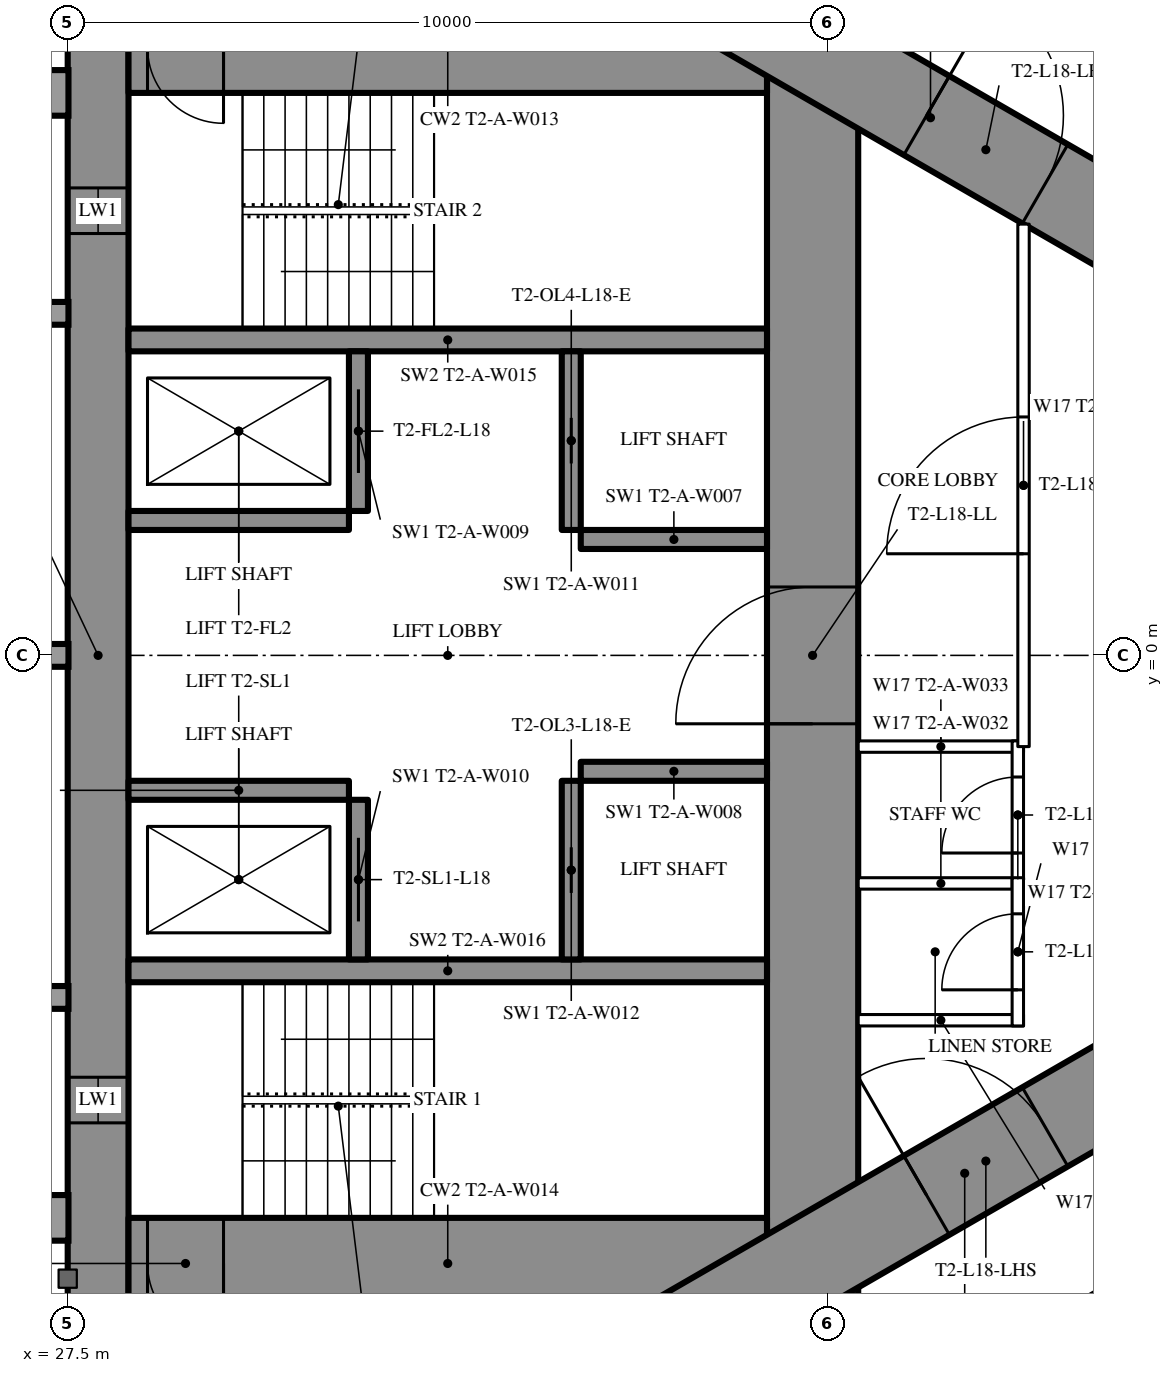
"""IFC4 building model, lengths in metres.
Left out: names, types, materials, properties, quantities, classifications, styles, units other than length and angle.
Written with IfcOpenShell. Run it as: python <this file> out.ifc"""

import sys

from ifc_helpers import new_model, si_unit, direction, frame, frame_2d, origin, place, context, subcontext, project, spatial, rectangle, extrude, element, fill, save


model = new_model("IFC4")
c1 = context("Model", 3, precision=1e-05, world=origin(), true_north=direction((0.0, 1.0)))
c2 = subcontext(c1, "Body", "Model", "MODEL_VIEW")
j1 = project(units=[si_unit("LENGTHUNIT", "METRE"), si_unit("PLANEANGLEUNIT", "RADIAN")], contexts=[c1])
p1 = place(None, origin())
s1 = spatial("IfcSite", under=j1, at=p1, CompositionType="ELEMENT")
p2 = place(p1, origin())
s2 = spatial("IfcBuilding", under=s1, at=p2, CompositionType="ELEMENT")
p3 = place(p2, frame((0.0, 0.0, 70.5)))
s3 = spatial("IfcBuildingStorey", under=s2, at=p3, CompositionType="ELEMENT", Elevation=70.5)
p4 = place(p3, frame((27.9, -8.6, 0.0), z_axis=(0.0, 0.0, 1.0), x_axis=(0.0, 1.0, 0.0)))
e1 = element("IfcWall", 1, at=p4, inside=s3, PredefinedType="SHEAR", context=c2, shape_type="SweptSolid", body=[
    extrude(rectangle(XDim=17.2, YDim=0.8, at=frame_2d((8.6, 0.0))), origin(), (0.0, 0.0, 1.0), 3.5),
])
p5 = place(p4, frame((2.45, 0.0, 0.6)))
e2 = element("IfcOpeningElement", 2, at=p5, cuts=e1, PredefinedType="OPENING", context=c2, shape_type="SweptSolid", body=[
    extrude(rectangle(XDim=0.6, YDim=2.1, at=frame_2d((0.3, 1.05))), frame((0.0, 0.41, 0.0), z_axis=(0.0, -1.0, 0.0), x_axis=(1.0, 0.0, 0.0)), (0.0, 0.0, 1.0), 0.82),
])
p6 = place(p4, frame((14.15, 0.0, 0.6)))
e3 = element("IfcOpeningElement", 3, at=p6, cuts=e1, PredefinedType="OPENING", context=c2, shape_type="SweptSolid", body=[
    extrude(rectangle(XDim=0.6, YDim=2.1, at=frame_2d((0.3, 1.05))), frame((0.0, 0.41, 0.0), z_axis=(0.0, -1.0, 0.0), x_axis=(1.0, 0.0, 0.0)), (0.0, 0.0, 1.0), 0.82),
])
p7 = place(p3, frame((37.3, -8.6, 0.0), z_axis=(0.0, 0.0, 1.0), x_axis=(0.0, 1.0, 0.0)))
e4 = element("IfcWall", 4, at=p7, inside=s3, PredefinedType="SHEAR", context=c2, shape_type="SweptSolid", body=[
    extrude(rectangle(XDim=17.2, YDim=1.2, at=frame_2d((8.6, 0.0))), origin(), (0.0, 0.0, 1.0), 3.5),
])
p8 = place(p7, frame((7.7, 0.0, 0.0)))
e5 = element("IfcOpeningElement", 5, at=p8, cuts=e4, PredefinedType="OPENING", context=c2, shape_type="SweptSolid", body=[
    extrude(rectangle(XDim=1.8, YDim=2.2, at=frame_2d((0.9, 1.1))), frame((0.0, 0.61, 0.0), z_axis=(0.0, -1.0, 0.0), x_axis=(1.0, 0.0, 0.0)), (0.0, 0.0, 1.0), 1.22),
])
p9 = place(p3, frame((28.3, -8.0, 0.0), z_axis=(0.0, 0.0, 1.0), x_axis=(1.0, 0.0, 0.0)))
e6 = element("IfcWall", 6, at=p9, inside=s3, PredefinedType="SHEAR", context=c2, shape_type="SweptSolid", body=[
    extrude(rectangle(XDim=8.4, YDim=1.2, at=frame_2d((4.2, 0.0))), origin(), (0.0, 0.0, 1.0), 3.5),
])
p10 = place(p9, frame((0.25, 0.0, 0.0)))
e7 = element("IfcOpeningElement", 7, at=p10, cuts=e6, PredefinedType="OPENING", context=c2, shape_type="SweptSolid", body=[
    extrude(rectangle(XDim=1.0, YDim=2.2, at=frame_2d((0.5, 1.1))), frame((0.0, 0.61, 0.0), z_axis=(0.0, -1.0, 0.0), x_axis=(1.0, 0.0, 0.0)), (0.0, 0.0, 1.0), 1.22),
])
p11 = place(p3, frame((28.3, 8.0, 0.0), z_axis=(0.0, 0.0, 1.0), x_axis=(1.0, 0.0, 0.0)))
e8 = element("IfcWall", 8, at=p11, inside=s3, PredefinedType="SHEAR", context=c2, shape_type="SweptSolid", body=[
    extrude(rectangle(XDim=8.4, YDim=1.2, at=frame_2d((4.2, 0.0))), origin(), (0.0, 0.0, 1.0), 3.5),
])
p12 = place(p11, frame((0.25, 0.0, 0.0)))
e9 = element("IfcOpeningElement", 9, at=p12, cuts=e8, PredefinedType="OPENING", context=c2, shape_type="SweptSolid", body=[
    extrude(rectangle(XDim=1.0, YDim=2.2, at=frame_2d((0.5, 1.1))), frame((0.0, 0.61, 0.0), z_axis=(0.0, -1.0, 0.0), x_axis=(1.0, 0.0, 0.0)), (0.0, 0.0, 1.0), 1.22),
])
for number, where, z_axis, x_axis in (
    (10, (28.3, -4.15, 0.0), (0.0, 0.0, 1.0), (1.0, 0.0, 0.0)),
    (11, (28.3, 4.15, 0.0), (0.0, 0.0, 1.0), (1.0, 0.0, 0.0)),
):
    element("IfcWall", number, at=place(p3, frame(where, z_axis=z_axis, x_axis=x_axis)), inside=s3, PredefinedType="SHEAR", context=c2, shape_type="SweptSolid", body=[
        extrude(rectangle(XDim=8.4, YDim=0.3, at=frame_2d((4.2, 0.0))), origin(), (0.0, 0.0, 1.0), 3.5),
    ])
p13 = place(p3, frame((31.325, -4.0, 0.0), z_axis=(0.0, 0.0, 1.0), x_axis=(0.0, 1.0, 0.0)))
e12 = element("IfcWall", 12, at=p13, inside=s3, PredefinedType="SHEAR", context=c2, shape_type="SweptSolid", body=[
    extrude(rectangle(XDim=2.1, YDim=0.25, at=frame_2d((1.05, 0.0))), origin(), (0.0, 0.0, 1.0), 3.5),
])
p14 = place(p13, frame((0.5, 0.0, 0.0)))
e13 = element("IfcOpeningElement", 13, at=p14, cuts=e12, PredefinedType="OPENING", context=c2, shape_type="SweptSolid", body=[
    extrude(rectangle(XDim=1.1, YDim=2.2, at=frame_2d((0.55, 1.1))), frame((0.0, 0.135, 0.0), z_axis=(0.0, -1.0, 0.0), x_axis=(1.0, 0.0, 0.0)), (0.0, 0.0, 1.0), 0.27),
])
p15 = place(p3, frame((34.125, -4.0, 0.0), z_axis=(0.0, 0.0, 1.0), x_axis=(0.0, 1.0, 0.0)))
e14 = element("IfcWall", 14, at=p15, inside=s3, PredefinedType="SHEAR", context=c2, shape_type="SweptSolid", body=[
    extrude(rectangle(XDim=2.35, YDim=0.25, at=frame_2d((1.175, 0.0))), origin(), (0.0, 0.0, 1.0), 3.5),
])
p16 = place(p15, frame((0.875, 0.0, 0.0)))
e15 = element("IfcOpeningElement", 15, at=p16, cuts=e14, PredefinedType="OPENING", context=c2, shape_type="SweptSolid", body=[
    extrude(rectangle(XDim=0.6, YDim=2.0, at=frame_2d((0.3, 1.0))), frame((0.0, 0.135, 0.0), z_axis=(0.0, -1.0, 0.0), x_axis=(1.0, 0.0, 0.0)), (0.0, 0.0, 1.0), 0.27),
])
p17 = place(p3, frame((28.3, -1.775, 0.0), z_axis=(0.0, 0.0, 1.0), x_axis=(1.0, 0.0, 0.0)))
e16 = element("IfcWall", 16, at=p17, inside=s3, PredefinedType="SHEAR", context=c2, shape_type="SweptSolid", body=[
    extrude(rectangle(XDim=2.9, YDim=0.25, at=frame_2d((1.45, 0.0))), origin(), (0.0, 0.0, 1.0), 3.5),
])
p18 = place(p3, frame((34.25, -1.525, 0.0), z_axis=(0.0, 0.0, 1.0), x_axis=(1.0, 0.0, 0.0)))
e17 = element("IfcWall", 17, at=p18, inside=s3, PredefinedType="SHEAR", context=c2, shape_type="SweptSolid", body=[
    extrude(rectangle(XDim=2.45, YDim=0.25, at=frame_2d((1.225, 0.0))), origin(), (0.0, 0.0, 1.0), 3.5),
])
p19 = place(p3, frame((31.325, 1.9, 0.0), z_axis=(0.0, 0.0, 1.0), x_axis=(0.0, 1.0, 0.0)))
e18 = element("IfcWall", 18, at=p19, inside=s3, PredefinedType="SHEAR", context=c2, shape_type="SweptSolid", body=[
    extrude(rectangle(XDim=2.1, YDim=0.25, at=frame_2d((1.05, 0.0))), origin(), (0.0, 0.0, 1.0), 3.5),
])
p20 = place(p19, frame((0.5, 0.0, 0.0)))
e19 = element("IfcOpeningElement", 19, at=p20, cuts=e18, PredefinedType="OPENING", context=c2, shape_type="SweptSolid", body=[
    extrude(rectangle(XDim=1.1, YDim=2.2, at=frame_2d((0.55, 1.1))), frame((0.0, 0.135, 0.0), z_axis=(0.0, -1.0, 0.0), x_axis=(1.0, 0.0, 0.0)), (0.0, 0.0, 1.0), 0.27),
])
p21 = place(p3, frame((34.125, 1.65, 0.0), z_axis=(0.0, 0.0, 1.0), x_axis=(0.0, 1.0, 0.0)))
e20 = element("IfcWall", 20, at=p21, inside=s3, PredefinedType="SHEAR", context=c2, shape_type="SweptSolid", body=[
    extrude(rectangle(XDim=2.35, YDim=0.25, at=frame_2d((1.175, 0.0))), origin(), (0.0, 0.0, 1.0), 3.5),
])
p22 = place(p21, frame((0.875, 0.0, 0.0)))
e21 = element("IfcOpeningElement", 21, at=p22, cuts=e20, PredefinedType="OPENING", context=c2, shape_type="SweptSolid", body=[
    extrude(rectangle(XDim=0.6, YDim=2.0, at=frame_2d((0.3, 1.0))), frame((0.0, 0.135, 0.0), z_axis=(0.0, -1.0, 0.0), x_axis=(1.0, 0.0, 0.0)), (0.0, 0.0, 1.0), 0.27),
])
p23 = place(p3, frame((28.3, 1.775, 0.0), z_axis=(0.0, 0.0, 1.0), x_axis=(1.0, 0.0, 0.0)))
e22 = element("IfcWall", 22, at=p23, inside=s3, PredefinedType="SHEAR", context=c2, shape_type="SweptSolid", body=[
    extrude(rectangle(XDim=2.9, YDim=0.25, at=frame_2d((1.45, 0.0))), origin(), (0.0, 0.0, 1.0), 3.5),
])
p24 = place(p3, frame((34.25, 1.525, 0.0), z_axis=(0.0, 0.0, 1.0), x_axis=(1.0, 0.0, 0.0)))
e23 = element("IfcWall", 23, at=p24, inside=s3, PredefinedType="SHEAR", context=c2, shape_type="SweptSolid", body=[
    extrude(rectangle(XDim=2.45, YDim=0.25, at=frame_2d((1.225, 0.0))), origin(), (0.0, 0.0, 1.0), 3.5),
])
p25 = place(p3, frame((27.2, -13.8, 0.0), z_axis=(0.0, 0.0, 1.0), x_axis=(0.866027159892, 0.499996958321, 0.0)))
e24 = element("IfcWall", 24, at=p25, inside=s3, PredefinedType="SHEAR", context=c2, shape_type="SweptSolid", body=[
    extrude(rectangle(XDim=27.947, YDim=1.2, at=frame_2d((13.973, 0.0))), origin(), (0.0, 0.0, 1.0), 3.5),
])
p26 = place(p25, frame((4.6, 0.0, 0.0)))
e25 = element("IfcOpeningElement", 25, at=p26, cuts=e24, PredefinedType="OPENING", context=c2, shape_type="SweptSolid", body=[
    extrude(rectangle(XDim=1.0, YDim=2.2, at=frame_2d((0.5, 1.1))), frame((0.0, 0.61, 0.0), z_axis=(0.0, -1.0, 0.0), x_axis=(1.0, 0.0, 0.0)), (0.0, 0.0, 1.0), 1.22),
])
p27 = place(p25, frame((13.395, 0.0, 0.0)))
e26 = element("IfcOpeningElement", 26, at=p27, cuts=e24, PredefinedType="OPENING", context=c2, shape_type="SweptSolid", body=[
    extrude(rectangle(XDim=1.8, YDim=2.2, at=frame_2d((0.9, 1.1))), frame((0.0, 0.61, 0.0), z_axis=(0.0, -1.0, 0.0), x_axis=(1.0, 0.0, 0.0)), (0.0, 0.0, 1.0), 1.22),
])
p28 = place(p3, frame((27.2, 13.8, 0.0), z_axis=(0.0, 0.0, 1.0), x_axis=(0.866024515034, -0.500001539357, 0.0)))
e27 = element("IfcWall", 27, at=p28, inside=s3, PredefinedType="SHEAR", context=c2, shape_type="SweptSolid", body=[
    extrude(rectangle(XDim=26.907, YDim=1.2, at=frame_2d((13.454, 0.0))), origin(), (0.0, 0.0, 1.0), 3.5),
])
p29 = place(p28, frame((4.6, 0.0, 0.0)))
e28 = element("IfcOpeningElement", 28, at=p29, cuts=e27, PredefinedType="OPENING", context=c2, shape_type="SweptSolid", body=[
    extrude(rectangle(XDim=1.0, YDim=2.2, at=frame_2d((0.5, 1.1))), frame((0.0, 0.61, 0.0), z_axis=(0.0, -1.0, 0.0), x_axis=(1.0, 0.0, 0.0)), (0.0, 0.0, 1.0), 1.22),
])
p30 = place(p28, frame((13.395, 0.0, 0.0)))
e29 = element("IfcOpeningElement", 29, at=p30, cuts=e27, PredefinedType="OPENING", context=c2, shape_type="SweptSolid", body=[
    extrude(rectangle(XDim=1.8, YDim=2.2, at=frame_2d((0.9, 1.1))), frame((0.0, 0.61, 0.0), z_axis=(0.0, -1.0, 0.0), x_axis=(1.0, 0.0, 0.0)), (0.0, 0.0, 1.0), 1.22),
])
p31 = place(p3, frame((36.834, 10.894, 0.0), z_axis=(0.0, 0.0, 1.0), x_axis=(0.866028157229, -0.499995230863, 0.0)))
e30 = element("IfcWall", 30, at=p31, inside=s3, PredefinedType="PARTITIONING", context=c2, shape_type="SweptSolid", body=[
    extrude(rectangle(XDim=21.667, YDim=0.2, at=frame_2d((10.833, 0.0))), origin(), (0.0, 0.0, 1.0), 3.25),
])
p32 = place(p31, frame((18.885, 0.0, 0.0)))
e31 = element("IfcOpeningElement", 31, at=p32, cuts=e30, PredefinedType="OPENING", context=c2, shape_type="SweptSolid", body=[
    extrude(rectangle(XDim=0.95, YDim=2.2, at=frame_2d((0.475, 1.1))), frame((0.0, 0.11, 0.0), z_axis=(0.0, -1.0, 0.0), x_axis=(1.0, 0.0, 0.0)), (0.0, 0.0, 1.0), 0.22),
])
p33 = place(p31, frame((15.443, 0.0, 0.0)))
e32 = element("IfcOpeningElement", 32, at=p33, cuts=e30, PredefinedType="OPENING", context=c2, shape_type="SweptSolid", body=[
    extrude(rectangle(XDim=1.8, YDim=2.2, at=frame_2d((0.9, 1.1))), frame((0.0, 0.11, 0.0), z_axis=(0.0, -1.0, 0.0), x_axis=(1.0, 0.0, 0.0)), (0.0, 0.0, 1.0), 0.22),
])
p34 = place(p31, frame((12.562, 0.0, 0.0)))
e33 = element("IfcOpeningElement", 33, at=p34, cuts=e30, PredefinedType="OPENING", context=c2, shape_type="SweptSolid", body=[
    extrude(rectangle(XDim=0.95, YDim=2.2, at=frame_2d((0.475, 1.1))), frame((0.0, 0.11, 0.0), z_axis=(0.0, -1.0, 0.0), x_axis=(1.0, 0.0, 0.0)), (0.0, 0.0, 1.0), 0.22),
])
p35 = place(p31, frame((4.292, 0.0, 0.0)))
e34 = element("IfcOpeningElement", 34, at=p35, cuts=e30, PredefinedType="OPENING", context=c2, shape_type="SweptSolid", body=[
    extrude(rectangle(XDim=1.0, YDim=2.2, at=frame_2d((0.5, 1.1))), frame((0.0, 0.11, 0.0), z_axis=(0.0, -1.0, 0.0), x_axis=(1.0, 0.0, 0.0)), (0.0, 0.0, 1.0), 0.22),
])
p36 = place(p3, frame((37.96, -10.243, 0.0), z_axis=(0.0, 0.0, 1.0), x_axis=(0.866030548046, 0.499991089772, 0.0)))
e35 = element("IfcWall", 35, at=p36, inside=s3, PredefinedType="PARTITIONING", context=c2, shape_type="SweptSolid", body=[
    extrude(rectangle(XDim=12.849, YDim=0.2, at=frame_2d((6.425, 0.0))), origin(), (0.0, 0.0, 1.0), 3.25),
])
p37 = place(p36, frame((8.949, 0.0, 0.0)))
e36 = element("IfcOpeningElement", 36, at=p37, cuts=e35, PredefinedType="OPENING", context=c2, shape_type="SweptSolid", body=[
    extrude(rectangle(XDim=0.95, YDim=2.2, at=frame_2d((0.475, 1.1))), frame((0.0, 0.11, 0.0), z_axis=(0.0, -1.0, 0.0), x_axis=(1.0, 0.0, 0.0)), (0.0, 0.0, 1.0), 0.22),
])
p38 = place(p36, frame((0.6, 0.0, 0.0)))
e37 = element("IfcOpeningElement", 37, at=p38, cuts=e35, PredefinedType="OPENING", context=c2, shape_type="SweptSolid", body=[
    extrude(rectangle(XDim=0.95, YDim=2.2, at=frame_2d((0.475, 1.1))), frame((0.0, 0.11, 0.0), z_axis=(0.0, -1.0, 0.0), x_axis=(1.0, 0.0, 0.0)), (0.0, 0.0, 1.0), 0.22),
])
for number, where, z_axis, x_axis in (
    (38, (37.9, -1.2, 0.0), (0.0, 0.0, 1.0), (1.0, 0.0, 0.0)),
    (39, (37.9, -3.0, 0.0), (0.0, 0.0, 1.0), (1.0, 0.0, 0.0)),
    (40, (37.9, -4.8, 0.0), (0.0, 0.0, 1.0), (1.0, 0.0, 0.0)),
):
    element("IfcWall", number, at=place(p3, frame(where, z_axis=z_axis, x_axis=x_axis)), inside=s3, PredefinedType="PARTITIONING", context=c2, shape_type="SweptSolid", body=[
        extrude(rectangle(XDim=2.175, YDim=0.15, at=frame_2d((1.087, 0.0))), origin(), (0.0, 0.0, 1.0), 3.25),
    ])
p39 = place(p3, frame((40.0, -3.075, 0.0), z_axis=(0.0, 0.0, 1.0), x_axis=(0.0, 1.0, 0.0)))
e41 = element("IfcWall", 41, at=p39, inside=s3, PredefinedType="PARTITIONING", context=c2, shape_type="SweptSolid", body=[
    extrude(rectangle(XDim=1.95, YDim=0.15, at=frame_2d((0.975, 0.0))), origin(), (0.0, 0.0, 1.0), 3.25),
])
p40 = place(p39, frame((0.475, 0.0, 0.0)))
e42 = element("IfcOpeningElement", 42, at=p40, cuts=e41, PredefinedType="OPENING", context=c2, shape_type="SweptSolid", body=[
    extrude(rectangle(XDim=1.0, YDim=2.2, at=frame_2d((0.5, 1.1))), frame((0.0, 0.085, 0.0), z_axis=(0.0, -1.0, 0.0), x_axis=(1.0, 0.0, 0.0)), (0.0, 0.0, 1.0), 0.17),
])
p41 = place(p3, frame((40.0, -4.875, 0.0), z_axis=(0.0, 0.0, 1.0), x_axis=(0.0, 1.0, 0.0)))
e43 = element("IfcWall", 43, at=p41, inside=s3, PredefinedType="PARTITIONING", context=c2, shape_type="SweptSolid", body=[
    extrude(rectangle(XDim=1.95, YDim=0.15, at=frame_2d((0.975, 0.0))), origin(), (0.0, 0.0, 1.0), 3.25),
])
p42 = place(p41, frame((0.475, 0.0, 0.0)))
e44 = element("IfcOpeningElement", 44, at=p42, cuts=e43, PredefinedType="OPENING", context=c2, shape_type="SweptSolid", body=[
    extrude(rectangle(XDim=1.0, YDim=2.2, at=frame_2d((0.5, 1.1))), frame((0.0, 0.085, 0.0), z_axis=(0.0, -1.0, 0.0), x_axis=(1.0, 0.0, 0.0)), (0.0, 0.0, 1.0), 0.17),
])
p43 = place(p3, frame((40.075, -1.2, 0.0), z_axis=(0.0, 0.0, 1.0), x_axis=(0.0, 1.0, 0.0)))
e45 = element("IfcWall", 45, at=p43, inside=s3, PredefinedType="PARTITIONING", context=c2, shape_type="SweptSolid", body=[
    extrude(rectangle(XDim=6.874, YDim=0.15, at=frame_2d((3.437, 0.0))), origin(), (0.0, 0.0, 1.0), 3.25),
])
p44 = place(p43, frame((2.537, 0.0, 0.0)))
e46 = element("IfcOpeningElement", 46, at=p44, cuts=e45, PredefinedType="OPENING", context=c2, shape_type="SweptSolid", body=[
    extrude(rectangle(XDim=1.8, YDim=2.2, at=frame_2d((0.9, 1.1))), frame((0.0, 0.085, 0.0), z_axis=(0.0, -1.0, 0.0), x_axis=(1.0, 0.0, 0.0)), (0.0, 0.0, 1.0), 0.17),
])
p45 = place(p40, origin())
e47 = element("IfcDoor", 47, at=p45, inside=s3, OperationType="SINGLE_SWING_LEFT", PredefinedType="DOOR", context=c2, shape_type="SweptSolid", body=[
    extrude(rectangle(XDim=1.0, YDim=2.2, at=frame_2d((0.5, 1.1))), frame((0.0, 0.025, 0.0), z_axis=(0.0, -1.0, 0.0), x_axis=(1.0, 0.0, 0.0)), (0.0, 0.0, 1.0), 0.05),
])
fill(e42, e47)
p46 = place(p42, origin())
e48 = element("IfcDoor", 48, at=p46, inside=s3, OperationType="SINGLE_SWING_LEFT", PredefinedType="DOOR", context=c2, shape_type="SweptSolid", body=[
    extrude(rectangle(XDim=1.0, YDim=2.2, at=frame_2d((0.5, 1.1))), frame((0.0, 0.025, 0.0), z_axis=(0.0, -1.0, 0.0), x_axis=(1.0, 0.0, 0.0)), (0.0, 0.0, 1.0), 0.05),
])
fill(e44, e48)
p47 = place(p44, origin())
e49 = element("IfcDoor", 49, at=p47, inside=s3, OperationType="DOUBLE_DOOR_SINGLE_SWING", PredefinedType="DOOR", context=c2, shape_type="SweptSolid", body=[
    extrude(rectangle(XDim=1.8, YDim=2.2, at=frame_2d((0.9, 1.1))), frame((0.0, 0.025, 0.0), z_axis=(0.0, -1.0, 0.0), x_axis=(1.0, 0.0, 0.0)), (0.0, 0.0, 1.0), 0.05),
])
fill(e46, e49)
p48 = place(p27, origin())
e50 = element("IfcDoor", 50, at=p48, inside=s3, OperationType="DOUBLE_DOOR_SINGLE_SWING", PredefinedType="DOOR", context=c2, shape_type="SweptSolid", body=[
    extrude(rectangle(XDim=1.8, YDim=2.2, at=frame_2d((0.9, 1.1))), frame((0.0, 0.025, 0.0), z_axis=(0.0, -1.0, 0.0), x_axis=(1.0, 0.0, 0.0)), (0.0, 0.0, 1.0), 0.05),
])
fill(e26, e50)
p49 = place(p30, origin())
e51 = element("IfcDoor", 51, at=p49, inside=s3, OperationType="DOUBLE_DOOR_SINGLE_SWING", PredefinedType="DOOR", context=c2, shape_type="SweptSolid", body=[
    extrude(rectangle(XDim=1.8, YDim=2.2, at=frame_2d((0.9, 1.1))), frame((0.0, 0.025, 0.0), z_axis=(0.0, -1.0, 0.0), x_axis=(1.0, 0.0, 0.0)), (0.0, 0.0, 1.0), 0.05),
])
fill(e29, e51)
p50 = place(p8, origin())
e52 = element("IfcDoor", 52, at=p50, inside=s3, OperationType="DOUBLE_DOOR_SINGLE_SWING", PredefinedType="DOOR", context=c2, shape_type="SweptSolid", body=[
    extrude(rectangle(XDim=1.8, YDim=2.2, at=frame_2d((0.9, 1.1))), frame((0.0, 0.025, 0.0), z_axis=(0.0, -1.0, 0.0), x_axis=(1.0, 0.0, 0.0)), (0.0, 0.0, 1.0), 0.05),
])
fill(e5, e52)
p51 = place(p10, origin())
e53 = element("IfcDoor", 53, at=p51, inside=s3, OperationType="SINGLE_SWING_RIGHT", PredefinedType="DOOR", context=c2, shape_type="SweptSolid", body=[
    extrude(rectangle(XDim=1.0, YDim=2.2, at=frame_2d((0.5, 1.1))), frame((0.0, 0.025, 0.0), z_axis=(0.0, -1.0, 0.0), x_axis=(1.0, 0.0, 0.0)), (0.0, 0.0, 1.0), 0.05),
])
fill(e7, e53)
p52 = place(p14, origin())
e54 = element("IfcDoor", 54, at=p52, inside=s3, OperationType="SLIDING_TO_LEFT", PredefinedType="USERDEFINED", context=c2, shape_type="SweptSolid", body=[
    extrude(rectangle(XDim=1.1, YDim=2.2, at=frame_2d((0.55, 1.1))), frame((0.0, 0.025, 0.0), z_axis=(0.0, -1.0, 0.0), x_axis=(1.0, 0.0, 0.0)), (0.0, 0.0, 1.0), 0.05),
])
fill(e13, e54)
p53 = place(p20, origin())
e55 = element("IfcDoor", 55, at=p53, inside=s3, OperationType="SLIDING_TO_LEFT", PredefinedType="USERDEFINED", context=c2, shape_type="SweptSolid", body=[
    extrude(rectangle(XDim=1.1, YDim=2.2, at=frame_2d((0.55, 1.1))), frame((0.0, 0.025, 0.0), z_axis=(0.0, -1.0, 0.0), x_axis=(1.0, 0.0, 0.0)), (0.0, 0.0, 1.0), 0.05),
])
fill(e19, e55)
p54 = place(p16, origin())
e56 = element("IfcDoor", 56, at=p54, inside=s3, OperationType="SLIDING_TO_LEFT", PredefinedType="DOOR", context=c2, shape_type="SweptSolid", body=[
    extrude(rectangle(XDim=0.6, YDim=2.0, at=frame_2d((0.3, 1.0))), frame((0.0, 0.025, 0.0), z_axis=(0.0, -1.0, 0.0), x_axis=(1.0, 0.0, 0.0)), (0.0, 0.0, 1.0), 0.05),
])
fill(e15, e56)
p55 = place(p22, origin())
e57 = element("IfcDoor", 57, at=p55, inside=s3, OperationType="SLIDING_TO_LEFT", PredefinedType="DOOR", context=c2, shape_type="SweptSolid", body=[
    extrude(rectangle(XDim=0.6, YDim=2.0, at=frame_2d((0.3, 1.0))), frame((0.0, 0.025, 0.0), z_axis=(0.0, -1.0, 0.0), x_axis=(1.0, 0.0, 0.0)), (0.0, 0.0, 1.0), 0.05),
])
fill(e21, e57)
p56 = place(p5, origin())
e58 = element("IfcWindow", 58, at=p56, inside=s3, PartitioningType="SINGLE_PANEL", PredefinedType="WINDOW", context=c2, shape_type="SweptSolid", body=[
    extrude(rectangle(XDim=0.6, YDim=2.1, at=frame_2d((0.3, 1.05))), frame((0.0, 0.03, 0.0), z_axis=(0.0, -1.0, 0.0), x_axis=(1.0, 0.0, 0.0)), (0.0, 0.0, 1.0), 0.06),
])
fill(e2, e58)
p57 = place(p6, origin())
e59 = element("IfcWindow", 59, at=p57, inside=s3, PartitioningType="SINGLE_PANEL", PredefinedType="WINDOW", context=c2, shape_type="SweptSolid", body=[
    extrude(rectangle(XDim=0.6, YDim=2.1, at=frame_2d((0.3, 1.05))), frame((0.0, 0.03, 0.0), z_axis=(0.0, -1.0, 0.0), x_axis=(1.0, 0.0, 0.0)), (0.0, 0.0, 1.0), 0.06),
])
fill(e3, e59)
save(model, sys.argv[1])
